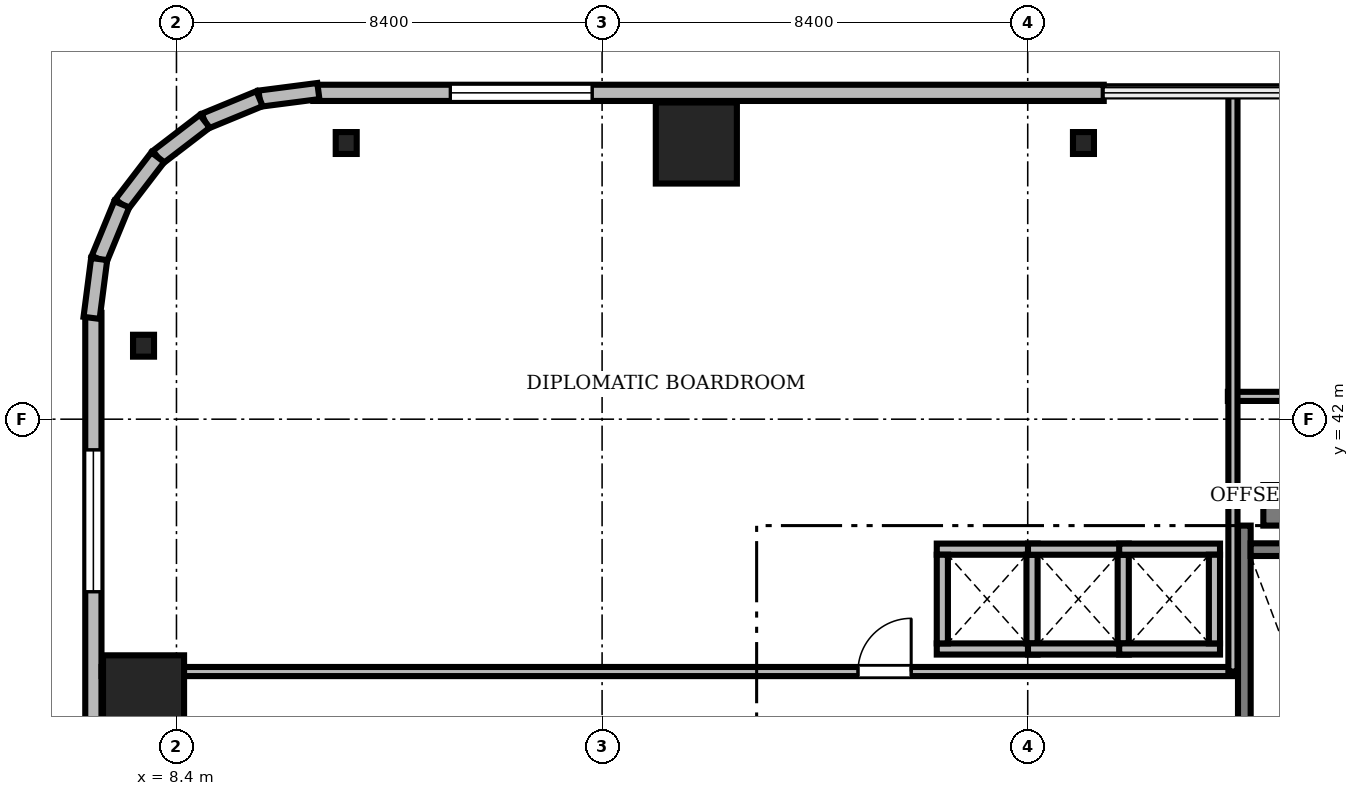
"""IFC4 building model, lengths in metres.
Left out: names, types, materials, properties, quantities, classifications, styles, units other than length and angle.
Written with IfcOpenShell. Run it as: python <this file> out.ifc"""

import sys

from ifc_helpers import new_model, si_unit, direction, frame, frame_2d, origin, origin_2d, place, context, subcontext, project, spatial, rectangle, i_section, extrude, source, transform, mapped, element, fill, save


model = new_model("IFC4")
c1 = context("Model", 3, precision=1e-05, world=origin(), true_north=direction((0.0, 1.0)))
c2 = subcontext(c1, "Body", "Model", "MODEL_VIEW")
j1 = project(units=[si_unit("LENGTHUNIT", "METRE"), si_unit("PLANEANGLEUNIT", "RADIAN")], contexts=[c1])
p1 = place(None, origin())
s1 = spatial("IfcSite", under=j1, at=p1, CompositionType="ELEMENT")
p2 = place(p1, origin())
s2 = spatial("IfcBuilding", under=s1, at=p2, CompositionType="ELEMENT")
p3 = place(p2, frame((0.0, 0.0, 103.7)))
s3 = spatial("IfcBuildingStorey", under=s2, at=p3, CompositionType="ELEMENT", Elevation=103.7)
m1 = source(origin(), c2, "Body", "SweptSolid", [
    extrude(rectangle(XDim=17.52, YDim=0.8, at=frame_2d((8.76, 0.0))), origin(), (0.0, 0.0, 1.0), 3.56),
])
p4 = place(p3, frame((29.85, 40.3, 0.0), z_axis=(0.0, 0.0, 1.0), x_axis=(1.0, 0.0, 0.0)))
e1 = element("IfcWall", 1, at=p4, inside=s3, PredefinedType="SHEAR", context=c2, shape_type="MappedRepresentation", body=[
    mapped(m1, transform((0.0, 0.0, 0.0), scale=1.0)),
])
m2 = source(origin(), c2, "Body", "SweptSolid", [
    extrude(rectangle(XDim=1.6, YDim=1.6, at=origin_2d()), origin(), (0.0, 0.0, 1.0), 3.56),
])
for number, where, z_axis, x_axis in (
    (2, (18.66, 47.45, 0.0), (0.0, 0.0, 1.0), (1.0, 0.0, 0.0)),
    (3, (7.75, 36.54, 0.0), (0.0, 0.0, 1.0), (1.0, 0.0, 0.0)),
):
    element("IfcColumn", number, at=place(p3, frame(where, z_axis=z_axis, x_axis=x_axis)), inside=s3, PredefinedType="COLUMN", context=c2, shape_type="MappedRepresentation", body=[
        mapped(m2, transform((0.0, 0.0, 0.0), scale=1.0)),
    ])
m3 = source(origin(), c2, "Body", "SweptSolid", [
    extrude(i_section(OverallWidth=0.414, OverallDepth=0.432, WebThickness=0.026, FlangeThickness=0.04, FilletRadius=0.015, at=origin_2d()), origin(), (0.0, 0.0, 1.0), 3.56),
])
for number, where, z_axis, x_axis in (
    (4, (26.3, 47.45, 0.0), (0.0, 0.0, 1.0), (1.0, 0.0, 0.0)),
    (5, (11.75, 47.45, 0.0), (0.0, 0.0, 1.0), (1.0, 0.0, 0.0)),
    (6, (7.75, 43.45, 0.0), (0.0, 0.0, 1.0), (1.0, 0.0, 0.0)),
):
    element("IfcColumn", number, at=place(p3, frame(where, z_axis=z_axis, x_axis=x_axis)), inside=s3, PredefinedType="COLUMN", context=c2, shape_type="MappedRepresentation", body=[
        mapped(m3, transform((0.0, 0.0, 0.0), scale=1.0)),
    ])
m4 = source(origin(), c2, "Body", "SweptSolid", [
    extrude(rectangle(XDim=15.6, YDim=0.32, at=frame_2d((7.8, 0.0))), origin(), (0.0, 0.0, 1.0), 3.56),
])
p5 = place(p3, frame((26.7, 48.44, 0.0), z_axis=(0.0, 0.0, 1.0), x_axis=(-1.0, 0.0, 0.0)))
e7 = element("IfcWall", 7, at=p5, inside=s3, PredefinedType="SOLIDWALL", context=c2, shape_type="MappedRepresentation", body=[
    mapped(m4, transform((0.0, 0.0, 0.0), scale=1.0)),
])
m5 = source(origin(), c2, "Body", "SweptSolid", [
    extrude(rectangle(XDim=2.8, YDim=2.4, at=frame_2d((1.4, 1.2))), frame((0.0, 0.17, 0.0), z_axis=(0.0, -1.0, 0.0), x_axis=(1.0, 0.0, 0.0)), (0.0, 0.0, 1.0), 0.34),
])
p6 = place(p5, frame((10.095, 0.0, 0.72)))
e8 = element("IfcOpeningElement", 8, at=p6, cuts=e7, PredefinedType="OPENING", context=c2, shape_type="MappedRepresentation", body=[
    mapped(m5, transform((0.0, 0.0, 0.0), scale=1.0)),
])
m6 = source(origin(), c2, "Body", "SweptSolid", [
    extrude(rectangle(XDim=15.6, YDim=0.32, at=frame_2d((7.8, 0.0))), origin(), (0.0, 0.0, 1.0), 3.56),
])
p7 = place(p3, frame((6.76, 44.1, 0.0), z_axis=(0.0, 0.0, 1.0), x_axis=(0.0, -1.0, 0.0)))
e9 = element("IfcWall", 9, at=p7, inside=s3, PredefinedType="SOLIDWALL", context=c2, shape_type="MappedRepresentation", body=[
    mapped(m6, transform((0.0, 0.0, 0.0), scale=1.0)),
])
m7 = source(origin(), c2, "Body", "SweptSolid", [
    extrude(rectangle(XDim=1.4, YDim=2.3, at=frame_2d((0.7, 1.15))), frame((0.0, 0.17, 0.0), z_axis=(0.0, -1.0, 0.0), x_axis=(1.0, 0.0, 0.0)), (0.0, 0.0, 1.0), 0.34),
])
p8 = place(p7, frame((9.61, 0.0, 0.0)))
e10 = element("IfcOpeningElement", 10, at=p8, cuts=e9, PredefinedType="OPENING", context=c2, shape_type="MappedRepresentation", body=[
    mapped(m7, transform((0.0, 0.0, 0.0), scale=1.0)),
])
p9 = place(p7, frame((2.705, 0.0, 0.72)))
e11 = element("IfcOpeningElement", 11, at=p9, cuts=e9, PredefinedType="OPENING", context=c2, shape_type="MappedRepresentation", body=[
    mapped(m5, transform((0.0, 0.0, 0.0), scale=1.0)),
])
m8 = source(origin(), c2, "Body", "SweptSolid", [
    extrude(rectangle(XDim=1.17, YDim=0.32, at=frame_2d((0.585, 0.0))), origin(), (0.0, 0.0, 1.0), 3.56),
])
p10 = place(p3, frame((11.2, 48.476, 0.0), z_axis=(0.0, 0.0, 1.0), x_axis=(-0.991735963317, -0.128295670475, 0.0)))
e12 = element("IfcWall", 12, at=p10, inside=s3, PredefinedType="SOLIDWALL", context=c2, shape_type="MappedRepresentation", body=[
    mapped(m8, transform((0.0, 0.0, 0.0), scale=1.0)),
])
m9 = source(origin(), c2, "Body", "SweptSolid", [
    extrude(rectangle(XDim=1.169, YDim=0.32, at=frame_2d((0.584, 0.0))), origin(), (0.0, 0.0, 1.0), 3.56),
])
p11 = place(p3, frame((10.04, 48.325, 0.0), z_axis=(0.0, 0.0, 1.0), x_axis=(-0.924552646638, -0.381054331552, 0.0)))
e13 = element("IfcWall", 13, at=p11, inside=s3, PredefinedType="SOLIDWALL", context=c2, shape_type="MappedRepresentation", body=[
    mapped(m9, transform((0.0, 0.0, 0.0), scale=1.0)),
])
m10 = source(origin(), c2, "Body", "SweptSolid", [
    extrude(rectangle(XDim=1.169, YDim=0.32, at=frame_2d((0.584, 0.0))), origin(), (0.0, 0.0, 1.0), 3.56),
])
p12 = place(p3, frame((8.959, 47.88, 0.0), z_axis=(0.0, 0.0, 1.0), x_axis=(-0.793663520347, -0.608356981114, 0.0)))
e14 = element("IfcWall", 14, at=p12, inside=s3, PredefinedType="SOLIDWALL", context=c2, shape_type="MappedRepresentation", body=[
    mapped(m10, transform((0.0, 0.0, 0.0), scale=1.0)),
])
m11 = source(origin(), c2, "Body", "SweptSolid", [
    extrude(rectangle(XDim=1.169, YDim=0.32, at=frame_2d((0.584, 0.0))), origin(), (0.0, 0.0, 1.0), 3.56),
])
p13 = place(p3, frame((8.031, 47.169, 0.0), z_axis=(0.0, 0.0, 1.0), x_axis=(-0.608387696831, -0.793639975269, 0.0)))
e15 = element("IfcWall", 15, at=p13, inside=s3, PredefinedType="SOLIDWALL", context=c2, shape_type="MappedRepresentation", body=[
    mapped(m11, transform((0.0, 0.0, 0.0), scale=1.0)),
])
p14 = place(p3, frame((7.32, 46.241, 0.0), z_axis=(0.0, 0.0, 1.0), x_axis=(-0.381054331552, -0.924552646638, 0.0)))
e16 = element("IfcWall", 16, at=p14, inside=s3, PredefinedType="SOLIDWALL", context=c2, shape_type="MappedRepresentation", body=[
    mapped(m9, transform((0.0, 0.0, 0.0), scale=1.0)),
])
p15 = place(p3, frame((6.875, 45.16, 0.0), z_axis=(0.0, 0.0, 1.0), x_axis=(-0.128295670475, -0.991735963317, 0.0)))
e17 = element("IfcWall", 17, at=p15, inside=s3, PredefinedType="SOLIDWALL", context=c2, shape_type="MappedRepresentation", body=[
    mapped(m8, transform((0.0, 0.0, 0.0), scale=1.0)),
])
m12 = source(origin(), c2, "Body", "SweptSolid", [
    extrude(rectangle(XDim=9.25, YDim=0.25, at=frame_2d((4.625, 0.0))), origin(), (0.0, 0.0, 1.0), 3.6),
])
p16 = place(p3, frame((29.475, 30.65, 0.0), z_axis=(0.0, 0.0, 1.0), x_axis=(0.0, 1.0, 0.0)))
e18 = element("IfcWall", 18, at=p16, inside=s3, PredefinedType="SOLIDWALL", context=c2, shape_type="MappedRepresentation", body=[
    mapped(m12, transform((0.0, 0.0, 0.0), scale=1.0)),
])
m13 = source(origin(), c2, "Body", "SweptSolid", [
    extrude(rectangle(XDim=3.15, YDim=0.25, at=frame_2d((1.575, 0.0))), origin(), (0.0, 0.0, 1.0), 3.6),
])
p17 = place(p3, frame((29.6, 39.425, 0.0), z_axis=(0.0, 0.0, 1.0), x_axis=(1.0, 0.0, 0.0)))
e19 = element("IfcWall", 19, at=p17, inside=s3, PredefinedType="SOLIDWALL", context=c2, shape_type="MappedRepresentation", body=[
    mapped(m13, transform((0.0, 0.0, 0.0), scale=1.0)),
])
m14 = source(origin(), c2, "Body", "SweptSolid", [
    extrude(rectangle(XDim=1.99, YDim=0.22, at=frame_2d((0.995, 0.0))), origin(), (0.0, 0.0, 1.0), 3.56),
])
for number, where, z_axis, x_axis in (
    (20, (23.405, 37.465, 0.0), (0.0, 0.0, 1.0), (1.0, 0.0, 0.0)),
    (21, (23.405, 39.435, 0.0), (0.0, 0.0, 1.0), (1.0, 0.0, 0.0)),
):
    element("IfcWall", number, at=place(p3, frame(where, z_axis=z_axis, x_axis=x_axis)), inside=s3, PredefinedType="SOLIDWALL", context=c2, shape_type="MappedRepresentation", body=[
        mapped(m14, transform((0.0, 0.0, 0.0), scale=1.0)),
    ])
m15 = source(origin(), c2, "Body", "SweptSolid", [
    extrude(rectangle(XDim=1.75, YDim=0.22, at=frame_2d((0.875, 0.0))), origin(), (0.0, 0.0, 1.0), 3.56),
])
for number, where, z_axis, x_axis in (
    (22, (23.515, 37.575, 0.0), (0.0, 0.0, 1.0), (0.0, 1.0, 0.0)),
    (23, (25.285, 37.575, 0.0), (0.0, 0.0, 1.0), (0.0, 1.0, 0.0)),
):
    element("IfcWall", number, at=place(p3, frame(where, z_axis=z_axis, x_axis=x_axis)), inside=s3, PredefinedType="SOLIDWALL", context=c2, shape_type="MappedRepresentation", body=[
        mapped(m15, transform((0.0, 0.0, 0.0), scale=1.0)),
    ])
for number, where, z_axis, x_axis in (
    (24, (25.205, 37.465, 0.0), (0.0, 0.0, 1.0), (1.0, 0.0, 0.0)),
    (25, (25.205, 39.435, 0.0), (0.0, 0.0, 1.0), (1.0, 0.0, 0.0)),
):
    element("IfcWall", number, at=place(p3, frame(where, z_axis=z_axis, x_axis=x_axis)), inside=s3, PredefinedType="SOLIDWALL", context=c2, shape_type="MappedRepresentation", body=[
        mapped(m14, transform((0.0, 0.0, 0.0), scale=1.0)),
    ])
p18 = place(p3, frame((27.085, 37.575, 0.0), z_axis=(0.0, 0.0, 1.0), x_axis=(0.0, 1.0, 0.0)))
e26 = element("IfcWall", 26, at=p18, inside=s3, PredefinedType="SOLIDWALL", context=c2, shape_type="MappedRepresentation", body=[
    mapped(m15, transform((0.0, 0.0, 0.0), scale=1.0)),
])
m16 = source(origin(), c2, "Body", "SweptSolid", [
    extrude(rectangle(XDim=1.99, YDim=0.22, at=frame_2d((0.995, 0.0))), origin(), (0.0, 0.0, 1.0), 3.56),
])
for number, where, z_axis, x_axis in (
    (27, (27.005, 37.465, 0.0), (0.0, 0.0, 1.0), (1.0, 0.0, 0.0)),
    (28, (27.005, 39.435, 0.0), (0.0, 0.0, 1.0), (1.0, 0.0, 0.0)),
):
    element("IfcWall", number, at=place(p3, frame(where, z_axis=z_axis, x_axis=x_axis)), inside=s3, PredefinedType="SOLIDWALL", context=c2, shape_type="MappedRepresentation", body=[
        mapped(m16, transform((0.0, 0.0, 0.0), scale=1.0)),
    ])
p19 = place(p3, frame((28.885, 37.575, 0.0), z_axis=(0.0, 0.0, 1.0), x_axis=(0.0, 1.0, 0.0)))
e29 = element("IfcWall", 29, at=p19, inside=s3, PredefinedType="SOLIDWALL", context=c2, shape_type="MappedRepresentation", body=[
    mapped(m15, transform((0.0, 0.0, 0.0), scale=1.0)),
])
m17 = source(origin(), c2, "Body", "SweptSolid", [
    extrude(rectangle(XDim=23.928, YDim=0.18, at=frame_2d((11.964, 0.0))), origin(), (0.0, 0.0, 1.0), 2.802),
])
p20 = place(p3, frame((29.15, 42.45, 0.0), z_axis=(0.0, 0.0, 1.0), x_axis=(1.0, 0.0, 0.0)))
e30 = element("IfcWall", 30, at=p20, inside=s3, PredefinedType="PARTITIONING", context=c2, shape_type="MappedRepresentation", body=[
    mapped(m17, transform((0.0, 0.0, 0.0), scale=1.0)),
])
m18 = source(origin(), c2, "Body", "SweptSolid", [
    extrude(rectangle(XDim=1.05, YDim=2.2, at=frame_2d((0.525, 1.1))), frame((0.0, 0.1, 0.0), z_axis=(0.0, -1.0, 0.0), x_axis=(1.0, 0.0, 0.0)), (0.0, 0.0, 1.0), 0.2),
])
p21 = place(p20, frame((4.5, 0.0, 0.0)))
e31 = element("IfcOpeningElement", 31, at=p21, cuts=e30, PredefinedType="OPENING", context=c2, shape_type="MappedRepresentation", body=[
    mapped(m18, transform((0.0, 0.0, 0.0), scale=1.0)),
])
m19 = source(origin(), c2, "Body", "SweptSolid", [
    extrude(rectangle(XDim=22.328, YDim=0.18, at=frame_2d((11.164, 0.0))), origin(), (0.0, 0.0, 1.0), 2.802),
])
p22 = place(p3, frame((6.922, 37.02, 0.0), z_axis=(0.0, 0.0, 1.0), x_axis=(1.0, 0.0, 0.0)))
e32 = element("IfcWall", 32, at=p22, inside=s3, PredefinedType="PARTITIONING", context=c2, shape_type="MappedRepresentation", body=[
    mapped(m19, transform((0.0, 0.0, 0.0), scale=1.0)),
])
p23 = place(p22, frame((14.928, 0.0, 0.0)))
e33 = element("IfcOpeningElement", 33, at=p23, cuts=e32, PredefinedType="OPENING", context=c2, shape_type="MappedRepresentation", body=[
    mapped(m18, transform((0.0, 0.0, 0.0), scale=1.0)),
])
m20 = source(origin(), c2, "Body", "SweptSolid", [
    extrude(rectangle(XDim=11.45, YDim=0.18, at=frame_2d((5.725, 0.0))), origin(), (0.0, 0.0, 1.0), 2.802),
])
p24 = place(p3, frame((29.25, 37.02, 0.0), z_axis=(0.0, 0.0, 1.0), x_axis=(0.0, 1.0, 0.0)))
e34 = element("IfcWall", 34, at=p24, inside=s3, PredefinedType="PARTITIONING", context=c2, shape_type="MappedRepresentation", body=[
    mapped(m20, transform((0.0, 0.0, 0.0), scale=1.0)),
])
m21 = source(origin(), c2, "Body", "SweptSolid", [
    extrude(rectangle(XDim=2.8, YDim=2.4, at=frame_2d((1.4, 1.2))), frame((0.0, 0.03, 0.0), z_axis=(0.0, -1.0, 0.0), x_axis=(1.0, 0.0, 0.0)), (0.0, 0.0, 1.0), 0.06),
])
p25 = place(p6, origin())
e35 = element("IfcWindow", 35, at=p25, inside=s3, PartitioningType="SINGLE_PANEL", PredefinedType="WINDOW", context=c2, shape_type="MappedRepresentation", body=[
    mapped(m21, transform((0.0, 0.0, 0.0), scale=1.0)),
])
fill(e8, e35)
p26 = place(p9, origin())
e36 = element("IfcWindow", 36, at=p26, inside=s3, PartitioningType="SINGLE_PANEL", PredefinedType="WINDOW", context=c2, shape_type="MappedRepresentation", body=[
    mapped(m21, transform((0.0, 0.0, 0.0), scale=1.0)),
])
fill(e11, e36)
m22 = source(origin(), c2, "Body", "SweptSolid", [
    extrude(rectangle(XDim=1.05, YDim=2.2, at=frame_2d((0.525, 1.1))), frame((0.0, 0.025, 0.0), z_axis=(0.0, -1.0, 0.0), x_axis=(1.0, 0.0, 0.0)), (0.0, 0.0, 1.0), 0.05),
])
p27 = place(p23, origin())
e37 = element("IfcDoor", 37, at=p27, inside=s3, OperationType="SINGLE_SWING_RIGHT", PredefinedType="DOOR", context=c2, shape_type="MappedRepresentation", body=[
    mapped(m22, transform((0.0, 0.0, 0.0), scale=1.0)),
])
fill(e33, e37)
save(model, sys.argv[1])
